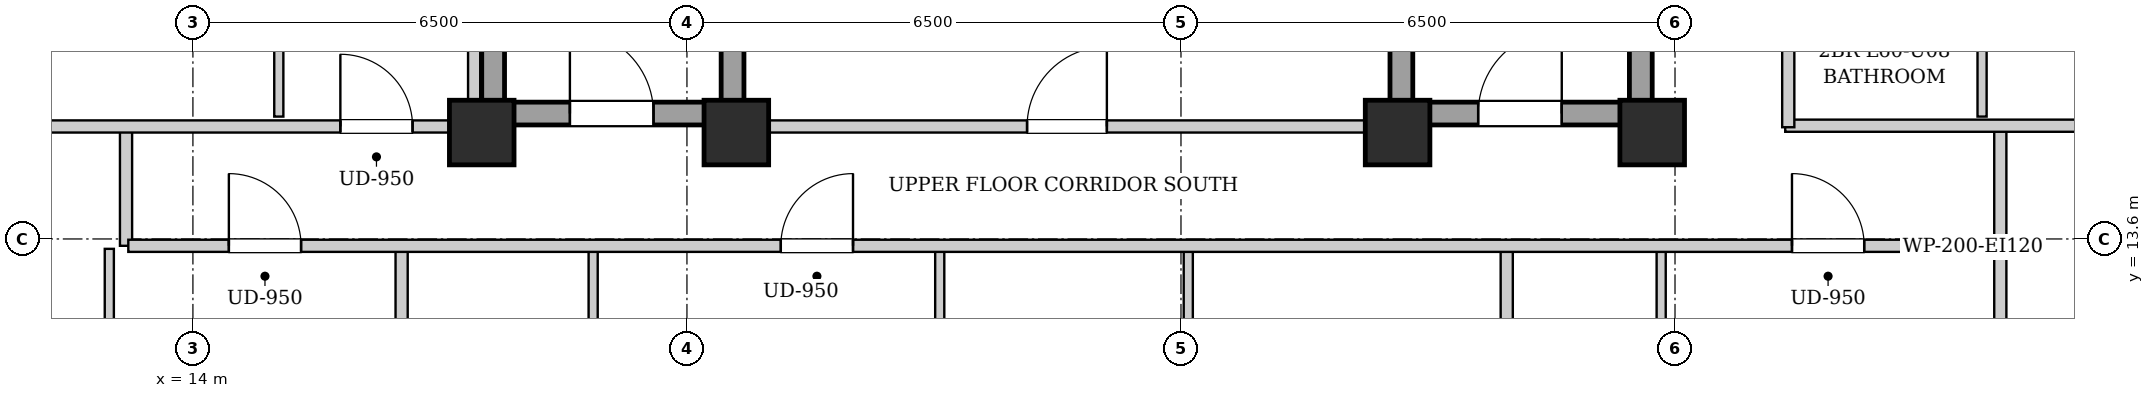
"""IFC4 building model, lengths in metres.
Left out: names, types, materials, properties, quantities, classifications, styles, units other than length and angle.
Written with IfcOpenShell. Run it as: python <this file> out.ifc"""

import sys

from ifc_helpers import new_model, si_unit, direction, frame, frame_2d, origin, origin_2d, place, context, subcontext, project, spatial, rectangle, extrude, element, fill, save


model = new_model("IFC4")
c1 = context("Model", 3, precision=1e-05, world=origin(), true_north=direction((0.0, 1.0)))
c2 = subcontext(c1, "Body", "Model", "MODEL_VIEW")
j1 = project(units=[si_unit("LENGTHUNIT", "METRE"), si_unit("PLANEANGLEUNIT", "RADIAN")], contexts=[c1])
p1 = place(None, origin())
s1 = spatial("IfcSite", under=j1, at=p1, CompositionType="ELEMENT")
p2 = place(p1, origin())
s2 = spatial("IfcBuilding", under=s1, at=p2, CompositionType="ELEMENT")
p3 = place(p2, frame((0.0, 0.0, 207.4)))
s3 = spatial("IfcBuildingStorey", under=s2, at=p3, CompositionType="ELEMENT", Elevation=207.4)
for number, where, z_axis, x_axis in (
    (1, (17.8, 15.0, 0.0), (0.0, 0.0, 1.0), (1.0, 0.0, 0.0)),
    (2, (21.15, 15.0, 0.0), (0.0, 0.0, 1.0), (1.0, 0.0, 0.0)),
    (3, (29.85, 15.0, 0.0), (0.0, 0.0, 1.0), (1.0, 0.0, 0.0)),
    (4, (33.2, 15.0, 0.0), (0.0, 0.0, 1.0), (1.0, 0.0, 0.0)),
):
    element("IfcColumn", number, at=place(p3, frame(where, z_axis=z_axis, x_axis=x_axis)), inside=s3, PredefinedType="COLUMN", context=c2, shape_type="SweptSolid", body=[
        extrude(rectangle(XDim=0.85, YDim=0.85, at=origin_2d()), origin(), (0.0, 0.0, 1.0), 3.3),
    ])
for number, where, z_axis, x_axis in (
    (5, (17.95, 15.1, 0.0), (0.0, 0.0, 1.0), (0.0, 1.0, 0.0)),
    (6, (21.1, 15.1, 0.0), (0.0, 0.0, 1.0), (0.0, 1.0, 0.0)),
):
    element("IfcWall", number, at=place(p3, frame(where, z_axis=z_axis, x_axis=x_axis)), inside=s3, PredefinedType="SHEAR", context=c2, shape_type="SweptSolid", body=[
        extrude(rectangle(XDim=9.0, YDim=0.3, at=frame_2d((4.5, 0.0))), origin(), (0.0, 0.0, 1.0), 3.04),
    ])
p4 = place(p3, frame((18.1, 15.25, 0.0), z_axis=(0.0, 0.0, 1.0), x_axis=(1.0, 0.0, 0.0)))
e7 = element("IfcWall", 7, at=p4, inside=s3, PredefinedType="SHEAR", context=c2, shape_type="SweptSolid", body=[
    extrude(rectangle(XDim=2.85, YDim=0.3, at=frame_2d((1.425, 0.0))), origin(), (0.0, 0.0, 1.0), 3.04),
])
p5 = place(p4, frame((0.86, 0.0, 0.0)))
e8 = element("IfcOpeningElement", 8, at=p5, cuts=e7, PredefinedType="OPENING", context=c2, shape_type="SweptSolid", body=[
    extrude(rectangle(XDim=1.1, YDim=2.05, at=frame_2d((0.55, 1.025))), frame((0.0, 0.16, 0.0), z_axis=(0.0, -1.0, 0.0), x_axis=(1.0, 0.0, 0.0)), (0.0, 0.0, 1.0), 0.32),
])
for number, where, z_axis, x_axis in (
    (9, (29.9, 15.1, 0.0), (0.0, 0.0, 1.0), (0.0, 1.0, 0.0)),
    (10, (33.05, 15.1, 0.0), (0.0, 0.0, 1.0), (0.0, 1.0, 0.0)),
):
    element("IfcWall", number, at=place(p3, frame(where, z_axis=z_axis, x_axis=x_axis)), inside=s3, PredefinedType="SHEAR", context=c2, shape_type="SweptSolid", body=[
        extrude(rectangle(XDim=9.0, YDim=0.3, at=frame_2d((4.5, 0.0))), origin(), (0.0, 0.0, 1.0), 3.04),
    ])
p6 = place(p3, frame((30.05, 15.25, 0.0), z_axis=(0.0, 0.0, 1.0), x_axis=(1.0, 0.0, 0.0)))
e11 = element("IfcWall", 11, at=p6, inside=s3, PredefinedType="SHEAR", context=c2, shape_type="SweptSolid", body=[
    extrude(rectangle(XDim=2.85, YDim=0.3, at=frame_2d((1.425, 0.0))), origin(), (0.0, 0.0, 1.0), 3.04),
])
p7 = place(p6, frame((0.86, 0.0, 0.0)))
e12 = element("IfcOpeningElement", 12, at=p7, cuts=e11, PredefinedType="OPENING", context=c2, shape_type="SweptSolid", body=[
    extrude(rectangle(XDim=1.1, YDim=2.05, at=frame_2d((0.55, 1.025))), frame((0.0, 0.16, 0.0), z_axis=(0.0, -1.0, 0.0), x_axis=(1.0, 0.0, 0.0)), (0.0, 0.0, 1.0), 0.32),
])
p8 = place(p3, frame((21.25, 15.08, 0.0), z_axis=(0.0, 0.0, 1.0), x_axis=(1.0, 0.0, 0.0)))
e13 = element("IfcWall", 13, at=p8, inside=s3, PredefinedType="PARTITIONING", context=c2, shape_type="SweptSolid", body=[
    extrude(rectangle(XDim=8.5, YDim=0.16, at=frame_2d((4.25, 0.0))), origin(), (0.0, 0.0, 1.0), 2.556),
])
p9 = place(p8, frame((3.725, 0.0, 0.0)))
e14 = element("IfcOpeningElement", 14, at=p9, cuts=e13, PredefinedType="OPENING", context=c2, shape_type="SweptSolid", body=[
    extrude(rectangle(XDim=1.05, YDim=2.05, at=frame_2d((0.525, 1.025))), frame((0.0, 0.09, 0.0), z_axis=(0.0, -1.0, 0.0), x_axis=(1.0, 0.0, 0.0)), (0.0, 0.0, 1.0), 0.18),
])
for number, where, z_axis, x_axis in (
    (15, (13.12, 13.51, 0.0), (0.0, 0.0, 1.0), (0.0, 1.0, 0.0)),
    (16, (37.78, 13.51, 0.0), (0.0, 0.0, 1.0), (0.0, 1.0, 0.0)),
):
    element("IfcWall", number, at=place(p3, frame(where, z_axis=z_axis, x_axis=x_axis)), inside=s3, PredefinedType="PARTITIONING", context=c2, shape_type="SweptSolid", body=[
        extrude(rectangle(XDim=1.58, YDim=0.16, at=frame_2d((0.79, 0.0))), origin(), (0.0, 0.0, 1.0), 3.04),
    ])
p10 = place(p3, frame((34.95, 15.09, 0.0), z_axis=(0.0, 0.0, 1.0), x_axis=(1.0, 0.0, 0.0)))
e17 = element("IfcWall", 17, at=p10, inside=s3, PredefinedType="PARTITIONING", context=c2, shape_type="SweptSolid", body=[
    extrude(rectangle(XDim=5.07, YDim=0.16, at=frame_2d((2.535, 0.0))), origin(), (0.0, 0.0, 1.0), 2.556),
])
p11 = place(p3, frame((12.9, 10.62, 0.0), z_axis=(0.0, 0.0, 1.0), x_axis=(0.0, 1.0, 0.0)))
e18 = element("IfcWall", 18, at=p11, inside=s3, PredefinedType="PARTITIONING", context=c2, shape_type="SweptSolid", body=[
    extrude(rectangle(XDim=2.85, YDim=0.12, at=frame_2d((1.425, 0.0))), origin(), (0.0, 0.0, 1.0), 3.04),
])
p12 = place(p11, frame((0.995, 0.0, 0.0)))
e19 = element("IfcOpeningElement", 19, at=p12, cuts=e18, PredefinedType="OPENING", context=c2, shape_type="SweptSolid", body=[
    extrude(rectangle(XDim=0.86, YDim=2.05, at=frame_2d((0.43, 1.025))), frame((0.0, 0.07, 0.0), z_axis=(0.0, -1.0, 0.0), x_axis=(1.0, 0.0, 0.0)), (0.0, 0.0, 1.0), 0.14),
])
p13 = place(p3, frame((16.746, 6.06, 0.0), z_axis=(0.0, 0.0, 1.0), x_axis=(0.0, 1.0, 0.0)))
e20 = element("IfcWall", 20, at=p13, inside=s3, PredefinedType="PARTITIONING", context=c2, shape_type="SweptSolid", body=[
    extrude(rectangle(XDim=7.41, YDim=0.16, at=frame_2d((3.705, 0.0))), origin(), (0.0, 0.0, 1.0), 3.04),
])
p14 = place(p3, frame((19.266, 10.62, 0.0), z_axis=(0.0, 0.0, 1.0), x_axis=(0.0, 1.0, 0.0)))
e21 = element("IfcWall", 21, at=p14, inside=s3, PredefinedType="PARTITIONING", context=c2, shape_type="SweptSolid", body=[
    extrude(rectangle(XDim=2.85, YDim=0.12, at=frame_2d((1.425, 0.0))), origin(), (0.0, 0.0, 1.0), 3.04),
])
p15 = place(p14, frame((0.995, 0.0, 0.0)))
e22 = element("IfcOpeningElement", 22, at=p15, cuts=e21, PredefinedType="OPENING", context=c2, shape_type="SweptSolid", body=[
    extrude(rectangle(XDim=0.86, YDim=2.05, at=frame_2d((0.43, 1.025))), frame((0.0, 0.07, 0.0), z_axis=(0.0, -1.0, 0.0), x_axis=(1.0, 0.0, 0.0)), (0.0, 0.0, 1.0), 0.14),
])
p16 = place(p3, frame((23.826, 10.62, 0.0), z_axis=(0.0, 0.0, 1.0), x_axis=(0.0, 1.0, 0.0)))
e23 = element("IfcWall", 23, at=p16, inside=s3, PredefinedType="PARTITIONING", context=c2, shape_type="SweptSolid", body=[
    extrude(rectangle(XDim=2.85, YDim=0.12, at=frame_2d((1.425, 0.0))), origin(), (0.0, 0.0, 1.0), 3.04),
])
p17 = place(p16, frame((0.975, 0.0, 0.0)))
e24 = element("IfcOpeningElement", 24, at=p17, cuts=e23, PredefinedType="OPENING", context=c2, shape_type="SweptSolid", body=[
    extrude(rectangle(XDim=0.9, YDim=2.05, at=frame_2d((0.45, 1.025))), frame((0.0, 0.07, 0.0), z_axis=(0.0, -1.0, 0.0), x_axis=(1.0, 0.0, 0.0)), (0.0, 0.0, 1.0), 0.14),
])
p18 = place(p3, frame((27.096, 10.62, 0.0), z_axis=(0.0, 0.0, 1.0), x_axis=(0.0, 1.0, 0.0)))
e25 = element("IfcWall", 25, at=p18, inside=s3, PredefinedType="PARTITIONING", context=c2, shape_type="SweptSolid", body=[
    extrude(rectangle(XDim=2.85, YDim=0.12, at=frame_2d((1.425, 0.0))), origin(), (0.0, 0.0, 1.0), 3.04),
])
p19 = place(p18, frame((0.975, 0.0, 0.0)))
e26 = element("IfcOpeningElement", 26, at=p19, cuts=e25, PredefinedType="OPENING", context=c2, shape_type="SweptSolid", body=[
    extrude(rectangle(XDim=0.9, YDim=2.05, at=frame_2d((0.45, 1.025))), frame((0.0, 0.07, 0.0), z_axis=(0.0, -1.0, 0.0), x_axis=(1.0, 0.0, 0.0)), (0.0, 0.0, 1.0), 0.14),
])
p20 = place(p3, frame((37.78, 10.56, 0.0), z_axis=(0.0, 0.0, 1.0), x_axis=(0.0, 1.0, 0.0)))
e27 = element("IfcWall", 27, at=p20, inside=s3, PredefinedType="PARTITIONING", context=c2, shape_type="SweptSolid", body=[
    extrude(rectangle(XDim=2.91, YDim=0.16, at=frame_2d((1.455, 0.0))), origin(), (0.0, 0.0, 1.0), 3.04),
])
p21 = place(p3, frame((31.286, 4.08, 0.0), z_axis=(0.0, 0.0, 1.0), x_axis=(0.0, 1.0, 0.0)))
e28 = element("IfcWall", 28, at=p21, inside=s3, PredefinedType="PARTITIONING", context=c2, shape_type="SweptSolid", body=[
    extrude(rectangle(XDim=9.39, YDim=0.16, at=frame_2d((4.695, 0.0))), origin(), (0.0, 0.0, 1.0), 3.04),
])
p22 = place(p3, frame((33.318, 10.62, 0.0), z_axis=(0.0, 0.0, 1.0), x_axis=(0.0, 1.0, 0.0)))
e29 = element("IfcWall", 29, at=p22, inside=s3, PredefinedType="PARTITIONING", context=c2, shape_type="SweptSolid", body=[
    extrude(rectangle(XDim=2.85, YDim=0.12, at=frame_2d((1.425, 0.0))), origin(), (0.0, 0.0, 1.0), 3.04),
])
p23 = place(p22, frame((0.995, 0.0, 0.0)))
e30 = element("IfcOpeningElement", 30, at=p23, cuts=e29, PredefinedType="OPENING", context=c2, shape_type="SweptSolid", body=[
    extrude(rectangle(XDim=0.86, YDim=2.05, at=frame_2d((0.43, 1.025))), frame((0.0, 0.07, 0.0), z_axis=(0.0, -1.0, 0.0), x_axis=(1.0, 0.0, 0.0)), (0.0, 0.0, 1.0), 0.14),
])
p24 = place(p3, frame((10.88, 15.08, 0.0), z_axis=(0.0, 0.0, 1.0), x_axis=(1.0, 0.0, 0.0)))
e31 = element("IfcWall", 31, at=p24, inside=s3, PredefinedType="PARTITIONING", context=c2, shape_type="SweptSolid", body=[
    extrude(rectangle(XDim=6.88, YDim=0.16, at=frame_2d((3.44, 0.0))), origin(), (0.0, 0.0, 1.0), 2.556),
])
p25 = place(p24, frame((5.06, 0.0, 0.0)))
e32 = element("IfcOpeningElement", 32, at=p25, cuts=e31, PredefinedType="OPENING", context=c2, shape_type="SweptSolid", body=[
    extrude(rectangle(XDim=0.95, YDim=2.1, at=frame_2d((0.475, 1.05))), frame((0.0, 0.09, 0.0), z_axis=(0.0, -1.0, 0.0), x_axis=(1.0, 0.0, 0.0)), (0.0, 0.0, 1.0), 0.18),
])
p26 = place(p3, frame((15.13, 15.21, 0.0), z_axis=(0.0, 0.0, 1.0), x_axis=(0.0, 1.0, 0.0)))
e33 = element("IfcWall", 33, at=p26, inside=s3, PredefinedType="PARTITIONING", context=c2, shape_type="SweptSolid", body=[
    extrude(rectangle(XDim=4.5, YDim=0.12, at=frame_2d((2.25, 0.0))), origin(), (0.0, 0.0, 1.0), 3.04),
])
p27 = place(p26, frame((1.8, 0.0, 0.0)))
e34 = element("IfcOpeningElement", 34, at=p27, cuts=e33, PredefinedType="OPENING", context=c2, shape_type="SweptSolid", body=[
    extrude(rectangle(XDim=0.9, YDim=2.05, at=frame_2d((0.45, 1.025))), frame((0.0, 0.07, 0.0), z_axis=(0.0, -1.0, 0.0), x_axis=(1.0, 0.0, 0.0)), (0.0, 0.0, 1.0), 0.14),
])
p28 = place(p3, frame((37.54, 15.21, 0.0), z_axis=(0.0, 0.0, 1.0), x_axis=(0.0, 1.0, 0.0)))
e35 = element("IfcWall", 35, at=p28, inside=s3, PredefinedType="PARTITIONING", context=c2, shape_type="SweptSolid", body=[
    extrude(rectangle(XDim=2.3, YDim=0.12, at=frame_2d((1.15, 0.0))), origin(), (0.0, 0.0, 1.0), 3.04),
])
p29 = place(p3, frame((13.15, 13.51, 0.0), z_axis=(0.0, 0.0, 1.0), x_axis=(1.0, 0.0, 0.0)))
e36 = element("IfcWall", 36, at=p29, inside=s3, PredefinedType="PARTITIONING", context=c2, shape_type="SweptSolid", body=[
    extrude(rectangle(XDim=24.6, YDim=0.16, at=frame_2d((12.3, 0.0))), origin(), (0.0, 0.0, 1.0), 3.04),
])
p30 = place(p29, frame((1.323, 0.0, 0.0)))
e37 = element("IfcOpeningElement", 37, at=p30, cuts=e36, PredefinedType="OPENING", context=c2, shape_type="SweptSolid", body=[
    extrude(rectangle(XDim=0.95, YDim=2.1, at=frame_2d((0.475, 1.05))), frame((0.0, 0.09, 0.0), z_axis=(0.0, -1.0, 0.0), x_axis=(1.0, 0.0, 0.0)), (0.0, 0.0, 1.0), 0.18),
])
p31 = place(p29, frame((8.585, 0.0, 0.0)))
e38 = element("IfcOpeningElement", 38, at=p31, cuts=e36, PredefinedType="OPENING", context=c2, shape_type="SweptSolid", body=[
    extrude(rectangle(XDim=0.95, YDim=2.1, at=frame_2d((0.475, 1.05))), frame((0.0, 0.09, 0.0), z_axis=(0.0, -1.0, 0.0), x_axis=(1.0, 0.0, 0.0)), (0.0, 0.0, 1.0), 0.18),
])
p32 = place(p29, frame((21.889, 0.0, 0.0)))
e39 = element("IfcOpeningElement", 39, at=p32, cuts=e36, PredefinedType="OPENING", context=c2, shape_type="SweptSolid", body=[
    extrude(rectangle(XDim=0.95, YDim=2.1, at=frame_2d((0.475, 1.05))), frame((0.0, 0.09, 0.0), z_axis=(0.0, -1.0, 0.0), x_axis=(1.0, 0.0, 0.0)), (0.0, 0.0, 1.0), 0.18),
])
p33 = place(p3, frame((17.7, 15.02, 0.0), z_axis=(0.0, 0.0, 1.0), x_axis=(0.0, 1.0, 0.0)))
e40 = element("IfcWall", 40, at=p33, inside=s3, PredefinedType="PARTITIONING", context=c2, shape_type="SweptSolid", body=[
    extrude(rectangle(XDim=13.98, YDim=0.16, at=frame_2d((6.99, 0.0))), origin(), (0.0, 0.0, 1.0), 2.375),
])
p34 = place(p3, frame((34.99, 15.07, 0.0), z_axis=(0.0, 0.0, 1.0), x_axis=(0.0, 1.0, 0.0)))
e41 = element("IfcWall", 41, at=p34, inside=s3, PredefinedType="PARTITIONING", context=c2, shape_type="SweptSolid", body=[
    extrude(rectangle(XDim=13.93, YDim=0.16, at=frame_2d((6.965, 0.0))), origin(), (0.0, 0.0, 1.0), 3.04),
])
p35 = place(p34, frame((4.385, 0.0, 0.0)))
e42 = element("IfcOpeningElement", 42, at=p35, cuts=e41, PredefinedType="OPENING", context=c2, shape_type="SweptSolid", body=[
    extrude(rectangle(XDim=0.95, YDim=2.1, at=frame_2d((0.475, 1.05))), frame((0.0, 0.09, 0.0), z_axis=(0.0, -1.0, 0.0), x_axis=(1.0, 0.0, 0.0)), (0.0, 0.0, 1.0), 0.18),
])
p36 = place(p5, origin())
e43 = element("IfcDoor", 43, at=p36, inside=s3, OperationType="SINGLE_SWING_LEFT", PredefinedType="DOOR", context=c2, shape_type="SweptSolid", body=[
    extrude(rectangle(XDim=1.1, YDim=2.05, at=frame_2d((0.55, 1.025))), frame((0.0, 0.025, 0.0), z_axis=(0.0, -1.0, 0.0), x_axis=(1.0, 0.0, 0.0)), (0.0, 0.0, 1.0), 0.05),
])
fill(e8, e43)
p37 = place(p7, origin())
e44 = element("IfcDoor", 44, at=p37, inside=s3, OperationType="SINGLE_SWING_RIGHT", PredefinedType="DOOR", context=c2, shape_type="SweptSolid", body=[
    extrude(rectangle(XDim=1.1, YDim=2.05, at=frame_2d((0.55, 1.025))), frame((0.0, 0.025, 0.0), z_axis=(0.0, -1.0, 0.0), x_axis=(1.0, 0.0, 0.0)), (0.0, 0.0, 1.0), 0.05),
])
fill(e12, e44)
p38 = place(p9, origin())
e45 = element("IfcDoor", 45, at=p38, inside=s3, OperationType="SINGLE_SWING_RIGHT", PredefinedType="DOOR", context=c2, shape_type="SweptSolid", body=[
    extrude(rectangle(XDim=1.05, YDim=2.05, at=frame_2d((0.525, 1.025))), frame((0.0, 0.025, 0.0), z_axis=(0.0, -1.0, 0.0), x_axis=(1.0, 0.0, 0.0)), (0.0, 0.0, 1.0), 0.05),
])
fill(e14, e45)
p39 = place(p25, origin())
e46 = element("IfcDoor", 46, at=p39, inside=s3, OperationType="SINGLE_SWING_LEFT", PredefinedType="DOOR", context=c2, shape_type="SweptSolid", body=[
    extrude(rectangle(XDim=0.95, YDim=2.1, at=frame_2d((0.475, 1.05))), frame((0.0, 0.025, 0.0), z_axis=(0.0, -1.0, 0.0), x_axis=(1.0, 0.0, 0.0)), (0.0, 0.0, 1.0), 0.05),
])
fill(e32, e46)
p40 = place(p30, origin())
e47 = element("IfcDoor", 47, at=p40, inside=s3, OperationType="SINGLE_SWING_LEFT", PredefinedType="DOOR", context=c2, shape_type="SweptSolid", body=[
    extrude(rectangle(XDim=0.95, YDim=2.1, at=frame_2d((0.475, 1.05))), frame((0.0, 0.025, 0.0), z_axis=(0.0, -1.0, 0.0), x_axis=(1.0, 0.0, 0.0)), (0.0, 0.0, 1.0), 0.05),
])
fill(e37, e47)
p41 = place(p31, origin())
e48 = element("IfcDoor", 48, at=p41, inside=s3, OperationType="SINGLE_SWING_RIGHT", PredefinedType="DOOR", context=c2, shape_type="SweptSolid", body=[
    extrude(rectangle(XDim=0.95, YDim=2.1, at=frame_2d((0.475, 1.05))), frame((0.0, 0.025, 0.0), z_axis=(0.0, -1.0, 0.0), x_axis=(1.0, 0.0, 0.0)), (0.0, 0.0, 1.0), 0.05),
])
fill(e38, e48)
p42 = place(p32, origin())
e49 = element("IfcDoor", 49, at=p42, inside=s3, OperationType="SINGLE_SWING_LEFT", PredefinedType="DOOR", context=c2, shape_type="SweptSolid", body=[
    extrude(rectangle(XDim=0.95, YDim=2.1, at=frame_2d((0.475, 1.05))), frame((0.0, 0.025, 0.0), z_axis=(0.0, -1.0, 0.0), x_axis=(1.0, 0.0, 0.0)), (0.0, 0.0, 1.0), 0.05),
])
fill(e39, e49)
save(model, sys.argv[1])
